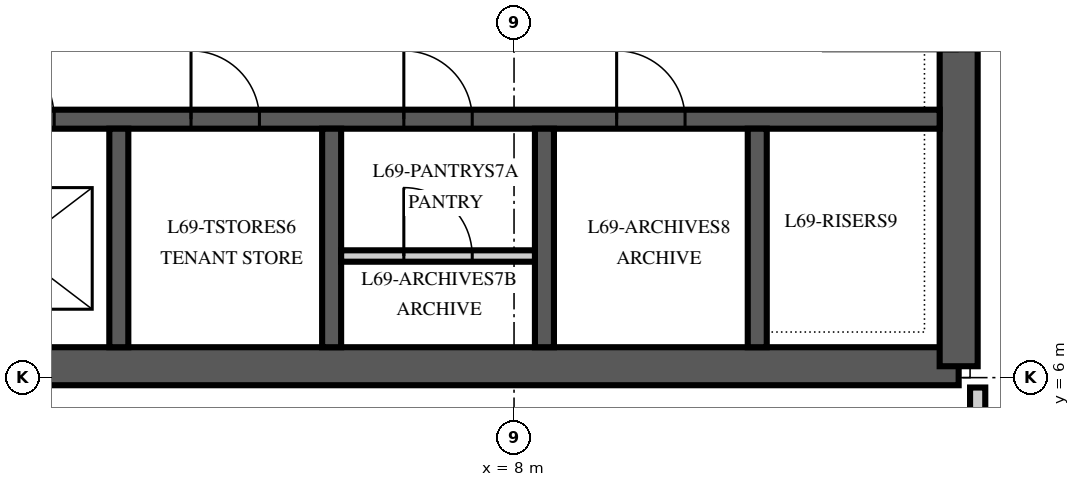
"""IFC4 building model, lengths in metres.
Left out: names, types, materials, properties, quantities, classifications, styles, units other than length and angle.
Written with IfcOpenShell. Run it as: python <this file> out.ifc"""

import sys

from ifc_helpers import new_model, si_unit, direction, frame, frame_2d, origin, place, context, subcontext, project, spatial, polyline, rectangle, outline, extrude, element, fill, save


model = new_model("IFC4")
c1 = context("Model", 3, precision=1e-05, world=origin(), true_north=direction((0.0, 1.0)))
c2 = subcontext(c1, "Body", "Model", "MODEL_VIEW")
j1 = project(units=[si_unit("LENGTHUNIT", "METRE"), si_unit("PLANEANGLEUNIT", "RADIAN")], contexts=[c1])
p1 = place(None, origin())
s1 = spatial("IfcSite", under=j1, at=p1, CompositionType="ELEMENT")
p2 = place(p1, origin())
s2 = spatial("IfcBuilding", under=s1, at=p2, CompositionType="ELEMENT")
p3 = place(p2, frame((0.0, 0.0, 296.0)))
s3 = spatial("IfcBuildingStorey", under=s2, at=p3, CompositionType="ELEMENT", Elevation=296.0)
p4 = place(p3, frame((-13.85, 6.15, 0.0), z_axis=(0.0, 0.0, 1.0), x_axis=(1.0, 0.0, 0.0)))
e1 = element("IfcWall", 1, at=p4, inside=s3, PredefinedType="SHEAR", context=c2, shape_type="SweptSolid", body=[
    extrude(rectangle(XDim=27.7, YDim=0.5, at=frame_2d((13.85, 0.0))), origin(), (0.0, 0.0, 1.0), 4.0),
])
p5 = place(p3, frame((13.85, 6.15, 0.0), z_axis=(0.0, 0.0, 1.0), x_axis=(0.0, 1.0, 0.0)))
e2 = element("IfcWall", 2, at=p5, inside=s3, PredefinedType="SHEAR", context=c2, shape_type="SweptSolid", body=[
    extrude(outline(polyline([(0.0, -0.25), (17.7, -0.25), (17.7, 0.0), (17.45, 0.0), (17.45, 0.25), (0.25, 0.25), (0.25, 0.0), (0.0, 0.0), (0.0, -0.25)])), origin(), (0.0, 0.0, 1.0), 4.0),
])
p6 = place(p5, frame((4.15, 0.0, 0.0)))
e3 = element("IfcOpeningElement", 3, at=p6, cuts=e2, PredefinedType="OPENING", context=c2, shape_type="SweptSolid", body=[
    extrude(rectangle(XDim=1.8, YDim=2.4, at=frame_2d((0.9, 1.2))), frame((0.0, 0.265, 0.0), z_axis=(0.0, -1.0, 0.0), x_axis=(1.0, 0.0, 0.0)), (0.0, 0.0, 1.0), 0.53),
])
p7 = place(p3, frame((-13.6, 9.4, 0.0), z_axis=(0.0, 0.0, 1.0), x_axis=(1.0, 0.0, 0.0)))
e4 = element("IfcWall", 4, at=p7, inside=s3, PredefinedType="SHEAR", context=c2, shape_type="SweptSolid", body=[
    extrude(rectangle(XDim=27.2, YDim=0.25, at=frame_2d((13.6, 0.0))), origin(), (0.0, 0.0, 1.0), 4.0),
])
p8 = place(p7, frame((8.85, 0.0, 0.0)))
e5 = element("IfcOpeningElement", 5, at=p8, cuts=e4, PredefinedType="OPENING", context=c2, shape_type="SweptSolid", body=[
    extrude(rectangle(XDim=1.1, YDim=2.1, at=frame_2d((0.55, 1.05))), frame((0.0, 0.14, 0.0), z_axis=(0.0, -1.0, 0.0), x_axis=(1.0, 0.0, 0.0)), (0.0, 0.0, 1.0), 0.28),
])
p9 = place(p7, frame((11.65, 0.0, 0.0)))
e6 = element("IfcOpeningElement", 6, at=p9, cuts=e4, PredefinedType="OPENING", context=c2, shape_type="SweptSolid", body=[
    extrude(rectangle(XDim=1.1, YDim=2.1, at=frame_2d((0.55, 1.05))), frame((0.0, 0.14, 0.0), z_axis=(0.0, -1.0, 0.0), x_axis=(1.0, 0.0, 0.0)), (0.0, 0.0, 1.0), 0.28),
])
p10 = place(p7, frame((14.45, 0.0, 0.0)))
e7 = element("IfcOpeningElement", 7, at=p10, cuts=e4, PredefinedType="OPENING", context=c2, shape_type="SweptSolid", body=[
    extrude(rectangle(XDim=1.1, YDim=2.1, at=frame_2d((0.55, 1.05))), frame((0.0, 0.14, 0.0), z_axis=(0.0, -1.0, 0.0), x_axis=(1.0, 0.0, 0.0)), (0.0, 0.0, 1.0), 0.28),
])
p11 = place(p7, frame((0.55, 0.0, 0.0)))
e8 = element("IfcOpeningElement", 8, at=p11, cuts=e4, PredefinedType="OPENING", context=c2, shape_type="SweptSolid", body=[
    extrude(rectangle(XDim=0.9, YDim=2.1, at=frame_2d((0.45, 1.05))), frame((0.0, 0.14, 0.0), z_axis=(0.0, -1.0, 0.0), x_axis=(1.0, 0.0, 0.0)), (0.0, 0.0, 1.0), 0.28),
])
p12 = place(p7, frame((3.35, 0.0, 0.0)))
e9 = element("IfcOpeningElement", 9, at=p12, cuts=e4, PredefinedType="OPENING", context=c2, shape_type="SweptSolid", body=[
    extrude(rectangle(XDim=0.9, YDim=2.1, at=frame_2d((0.45, 1.05))), frame((0.0, 0.14, 0.0), z_axis=(0.0, -1.0, 0.0), x_axis=(1.0, 0.0, 0.0)), (0.0, 0.0, 1.0), 0.28),
])
p13 = place(p7, frame((6.15, 0.0, 0.0)))
e10 = element("IfcOpeningElement", 10, at=p13, cuts=e4, PredefinedType="OPENING", context=c2, shape_type="SweptSolid", body=[
    extrude(rectangle(XDim=0.9, YDim=2.1, at=frame_2d((0.45, 1.05))), frame((0.0, 0.14, 0.0), z_axis=(0.0, -1.0, 0.0), x_axis=(1.0, 0.0, 0.0)), (0.0, 0.0, 1.0), 0.28),
])
p14 = place(p7, frame((17.35, 0.0, 0.0)))
e11 = element("IfcOpeningElement", 11, at=p14, cuts=e4, PredefinedType="OPENING", context=c2, shape_type="SweptSolid", body=[
    extrude(rectangle(XDim=0.9, YDim=2.1, at=frame_2d((0.45, 1.05))), frame((0.0, 0.14, 0.0), z_axis=(0.0, -1.0, 0.0), x_axis=(1.0, 0.0, 0.0)), (0.0, 0.0, 1.0), 0.28),
])
p15 = place(p7, frame((20.15, 0.0, 0.0)))
e12 = element("IfcOpeningElement", 12, at=p15, cuts=e4, PredefinedType="OPENING", context=c2, shape_type="SweptSolid", body=[
    extrude(rectangle(XDim=0.9, YDim=2.1, at=frame_2d((0.45, 1.05))), frame((0.0, 0.14, 0.0), z_axis=(0.0, -1.0, 0.0), x_axis=(1.0, 0.0, 0.0)), (0.0, 0.0, 1.0), 0.28),
])
p16 = place(p7, frame((22.95, 0.0, 0.0)))
e13 = element("IfcOpeningElement", 13, at=p16, cuts=e4, PredefinedType="OPENING", context=c2, shape_type="SweptSolid", body=[
    extrude(rectangle(XDim=0.9, YDim=2.1, at=frame_2d((0.45, 1.05))), frame((0.0, 0.14, 0.0), z_axis=(0.0, -1.0, 0.0), x_axis=(1.0, 0.0, 0.0)), (0.0, 0.0, 1.0), 0.28),
])
for number, where, z_axis, x_axis in (
    (14, (2.8, 6.4, 0.0), (0.0, 0.0, 1.0), (0.0, 1.0, 0.0)),
    (15, (5.6, 6.4, 0.0), (0.0, 0.0, 1.0), (0.0, 1.0, 0.0)),
    (16, (8.4, 6.4, 0.0), (0.0, 0.0, 1.0), (0.0, 1.0, 0.0)),
    (17, (11.2, 6.4, 0.0), (0.0, 0.0, 1.0), (0.0, 1.0, 0.0)),
):
    element("IfcWall", number, at=place(p3, frame(where, z_axis=z_axis, x_axis=x_axis)), inside=s3, PredefinedType="SHEAR", context=c2, shape_type="SweptSolid", body=[
        extrude(rectangle(XDim=2.875, YDim=0.25, at=frame_2d((1.438, 0.0))), origin(), (0.0, 0.0, 1.0), 4.0),
    ])
p17 = place(p3, frame((5.725, 7.6, 0.0), z_axis=(0.0, 0.0, 1.0), x_axis=(1.0, 0.0, 0.0)))
e18 = element("IfcWall", 18, at=p17, inside=s3, PredefinedType="PARTITIONING", context=c2, shape_type="SweptSolid", body=[
    extrude(rectangle(XDim=2.55, YDim=0.15, at=frame_2d((1.275, 0.0))), origin(), (0.0, 0.0, 1.0), 3.85),
])
p18 = place(p17, frame((0.825, 0.0, 0.0)))
e19 = element("IfcOpeningElement", 19, at=p18, cuts=e18, PredefinedType="OPENING", context=c2, shape_type="SweptSolid", body=[
    extrude(rectangle(XDim=0.9, YDim=2.1, at=frame_2d((0.45, 1.05))), frame((0.0, 0.09, 0.0), z_axis=(0.0, -1.0, 0.0), x_axis=(1.0, 0.0, 0.0)), (0.0, 0.0, 1.0), 0.18),
])
p19 = place(p3, frame((14.1, 4.05, 0.0), z_axis=(0.0, 0.0, 1.0), x_axis=(0.0, 1.0, 0.0)))
e20 = element("IfcWall", 20, at=p19, inside=s3, PredefinedType="PARTITIONING", context=c2, shape_type="SweptSolid", body=[
    extrude(rectangle(XDim=1.82, YDim=0.2, at=frame_2d((0.91, 0.0))), origin(), (0.0, 0.0, 1.0), 3.85),
])
p20 = place(p10, origin())
e21 = element("IfcDoor", 21, at=p20, inside=s3, OperationType="SLIDING_TO_LEFT", PredefinedType="DOOR", context=c2, shape_type="SweptSolid", body=[
    extrude(rectangle(XDim=1.1, YDim=2.1, at=frame_2d((0.55, 1.05))), frame((0.0, 0.125, 0.0), z_axis=(0.0, -1.0, 0.0), x_axis=(1.0, 0.0, 0.0)), (0.0, 0.0, 1.0), 0.25),
])
fill(e7, e21)
p21 = place(p14, origin())
e22 = element("IfcDoor", 22, at=p21, inside=s3, OperationType="SINGLE_SWING_LEFT", PredefinedType="DOOR", context=c2, shape_type="SweptSolid", body=[
    extrude(rectangle(XDim=0.9, YDim=2.1, at=frame_2d((0.45, 1.05))), frame((0.0, 0.125, 0.0), z_axis=(0.0, -1.0, 0.0), x_axis=(1.0, 0.0, 0.0)), (0.0, 0.0, 1.0), 0.25),
])
fill(e11, e22)
p22 = place(p15, origin())
e23 = element("IfcDoor", 23, at=p22, inside=s3, OperationType="SINGLE_SWING_LEFT", PredefinedType="DOOR", context=c2, shape_type="SweptSolid", body=[
    extrude(rectangle(XDim=0.9, YDim=2.1, at=frame_2d((0.45, 1.05))), frame((0.0, 0.125, 0.0), z_axis=(0.0, -1.0, 0.0), x_axis=(1.0, 0.0, 0.0)), (0.0, 0.0, 1.0), 0.25),
])
fill(e12, e23)
p23 = place(p18, origin())
e24 = element("IfcDoor", 24, at=p23, inside=s3, OperationType="SINGLE_SWING_LEFT", PredefinedType="DOOR", context=c2, shape_type="SweptSolid", body=[
    extrude(rectangle(XDim=0.9, YDim=2.1, at=frame_2d((0.45, 1.05))), frame((0.0, 0.075, 0.0), z_axis=(0.0, -1.0, 0.0), x_axis=(1.0, 0.0, 0.0)), (0.0, 0.0, 1.0), 0.149),
])
fill(e19, e24)
p24 = place(p16, origin())
e25 = element("IfcDoor", 25, at=p24, inside=s3, OperationType="SINGLE_SWING_LEFT", PredefinedType="DOOR", context=c2, shape_type="SweptSolid", body=[
    extrude(rectangle(XDim=0.9, YDim=2.1, at=frame_2d((0.45, 1.05))), frame((0.0, 0.125, 0.0), z_axis=(0.0, -1.0, 0.0), x_axis=(1.0, 0.0, 0.0)), (0.0, 0.0, 1.0), 0.25),
])
fill(e13, e25)
save(model, sys.argv[1])
